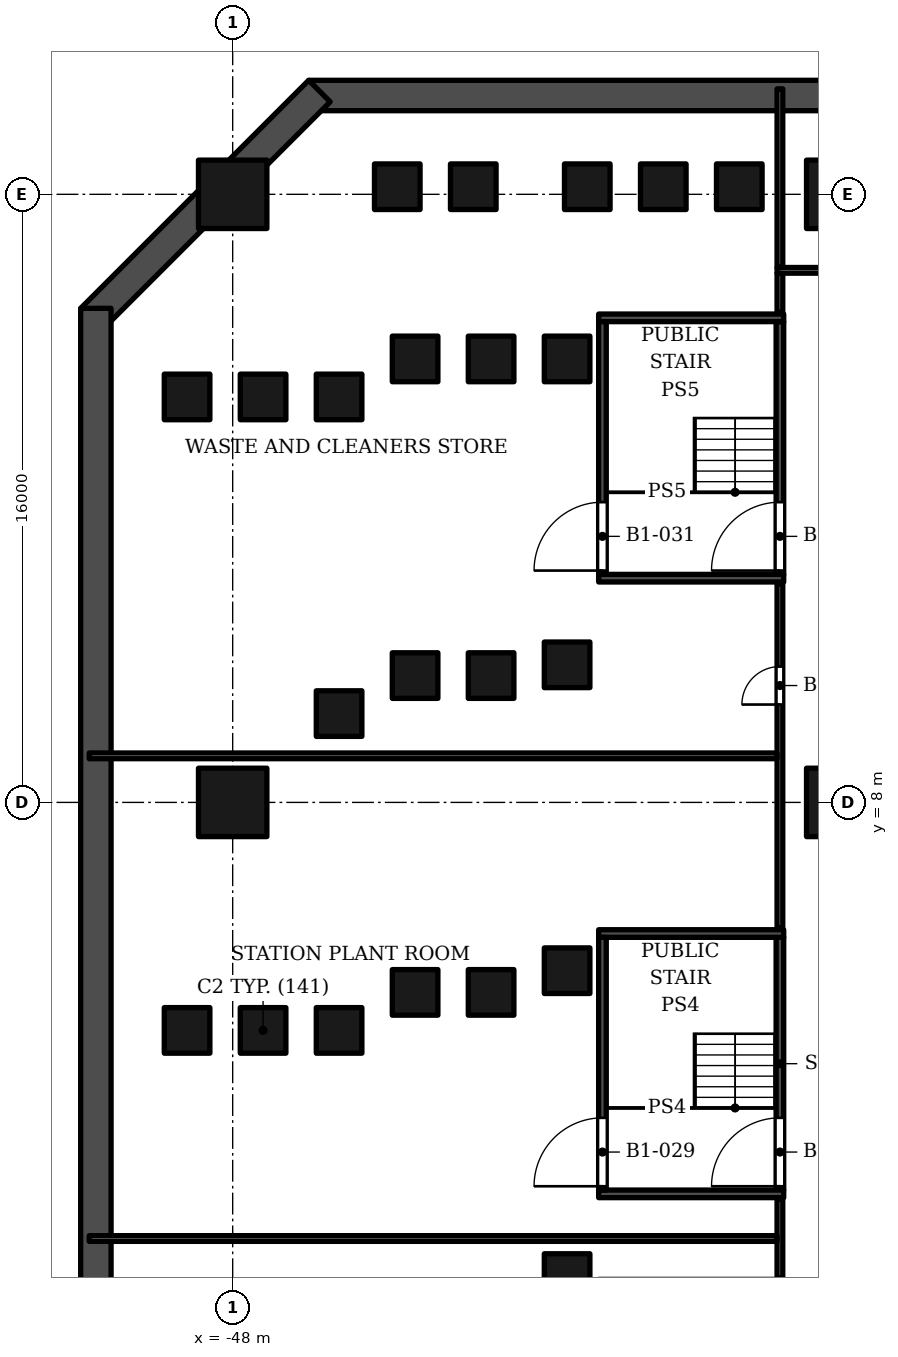
"""IFC4 building model, lengths in metres.
Left out: names, types, materials, properties, quantities, classifications, styles, units other than length and angle.
Written with IfcOpenShell. Run it as: python <this file> out.ifc"""

import sys

from ifc_helpers import new_model, si_unit, direction, frame, frame_2d, origin, origin_2d, place, context, subcontext, project, spatial, rectangle, extrude, element, fill, save


model = new_model("IFC4")
c1 = context("Model", 3, precision=1e-05, world=origin(), true_north=direction((0.0, 1.0)))
c2 = subcontext(c1, "Body", "Model", "MODEL_VIEW")
j1 = project(units=[si_unit("LENGTHUNIT", "METRE"), si_unit("PLANEANGLEUNIT", "RADIAN")], contexts=[c1])
p1 = place(None, origin())
s1 = spatial("IfcSite", under=j1, at=p1, CompositionType="ELEMENT")
p2 = place(p1, origin())
s2 = spatial("IfcBuilding", under=s1, at=p2, CompositionType="ELEMENT")
p3 = place(p2, frame((0.0, 0.0, -5.0)))
s3 = spatial("IfcBuildingStorey", under=s2, at=p3, CompositionType="ELEMENT", Elevation=-5.0)
p4 = place(p3, frame((46.0, 26.6, 0.0), z_axis=(0.0, 0.0, 1.0), x_axis=(-1.0, 0.0, 0.0)))
e1 = element("IfcWall", 1, at=p4, inside=s3, PredefinedType="SHEAR", context=c2, shape_type="SweptSolid", body=[
    extrude(rectangle(XDim=92.0, YDim=0.8, at=frame_2d((46.0, 0.0))), origin(), (0.0, 0.0, 1.0), 5.0),
])
p5 = place(p3, frame((-45.717, 26.717, 0.0), z_axis=(0.0, 0.0, 1.0), x_axis=(-0.707106781187, -0.707106781187, 0.0)))
e2 = element("IfcWall", 2, at=p5, inside=s3, PredefinedType="SHEAR", context=c2, shape_type="SweptSolid", body=[
    extrude(rectangle(XDim=8.485, YDim=0.8, at=frame_2d((4.243, 0.0))), origin(), (0.0, 0.0, 1.0), 5.0),
])
p6 = place(p3, frame((-51.6, 21.0, 0.0), z_axis=(0.0, 0.0, 1.0), x_axis=(0.0, -1.0, 0.0)))
e3 = element("IfcWall", 3, at=p6, inside=s3, PredefinedType="SHEAR", context=c2, shape_type="SweptSolid", body=[
    extrude(rectangle(XDim=32.6, YDim=0.8, at=frame_2d((16.3, 0.0))), origin(), (0.0, 0.0, 1.0), 5.0),
])
for number, where, z_axis, x_axis in (
    (4, (-48.0, 8.0, 0.0), (0.0, 0.0, 1.0), (1.0, 0.0, 0.0)),
    (5, (-48.0, 24.0, 0.0), (0.0, 0.0, 1.0), (1.0, 0.0, 0.0)),
    (6, (-32.0, 8.0, 0.0), (0.0, 0.0, 1.0), (1.0, 0.0, 0.0)),
    (7, (-32.0, 24.0, 0.0), (0.0, 0.0, 1.0), (1.0, 0.0, 0.0)),
):
    element("IfcColumn", number, at=place(p3, frame(where, z_axis=z_axis, x_axis=x_axis)), inside=s3, PredefinedType="COLUMN", context=c2, shape_type="SweptSolid", body=[
        extrude(rectangle(XDim=1.8, YDim=1.8, at=origin_2d()), origin(), (0.0, 0.0, 1.0), 5.0),
    ])
for number, where, z_axis, x_axis in (
    (8, (-39.2, 19.669, 0.0), (0.0, 0.0, 1.0), (1.0, 0.0, 0.0)),
    (9, (-34.669, 24.2, 0.0), (0.0, 0.0, 1.0), (1.0, 0.0, 0.0)),
    (10, (-39.2, -4.476, 0.0), (0.0, 0.0, 1.0), (1.0, 0.0, 0.0)),
    (11, (-39.2, 3.572, 0.0), (0.0, 0.0, 1.0), (1.0, 0.0, 0.0)),
    (12, (-39.2, 11.62, 0.0), (0.0, 0.0, 1.0), (1.0, 0.0, 0.0)),
    (13, (-41.2, 19.669, 0.0), (0.0, 0.0, 1.0), (1.0, 0.0, 0.0)),
    (14, (-36.669, 24.2, 0.0), (0.0, 0.0, 1.0), (1.0, 0.0, 0.0)),
    (15, (-41.2, 3.001, 0.0), (0.0, 0.0, 1.0), (1.0, 0.0, 0.0)),
    (16, (-41.2, 11.337, 0.0), (0.0, 0.0, 1.0), (1.0, 0.0, 0.0)),
    (17, (-43.2, 19.669, 0.0), (0.0, 0.0, 1.0), (1.0, 0.0, 0.0)),
    (18, (-38.669, 24.2, 0.0), (0.0, 0.0, 1.0), (1.0, 0.0, 0.0)),
    (19, (-43.2, 3.001, 0.0), (0.0, 0.0, 1.0), (1.0, 0.0, 0.0)),
    (20, (-43.2, 11.337, 0.0), (0.0, 0.0, 1.0), (1.0, 0.0, 0.0)),
    (21, (-45.2, 18.669, 0.0), (0.0, 0.0, 1.0), (1.0, 0.0, 0.0)),
    (22, (-45.2, 2.001, 0.0), (0.0, 0.0, 1.0), (1.0, 0.0, 0.0)),
    (23, (-45.2, 10.337, 0.0), (0.0, 0.0, 1.0), (1.0, 0.0, 0.0)),
    (24, (-47.2, 18.669, 0.0), (0.0, 0.0, 1.0), (1.0, 0.0, 0.0)),
    (25, (-41.669, 24.2, 0.0), (0.0, 0.0, 1.0), (1.0, 0.0, 0.0)),
    (26, (-47.2, 2.001, 0.0), (0.0, 0.0, 1.0), (1.0, 0.0, 0.0)),
    (27, (-49.2, 18.669, 0.0), (0.0, 0.0, 1.0), (1.0, 0.0, 0.0)),
    (28, (-43.669, 24.2, 0.0), (0.0, 0.0, 1.0), (1.0, 0.0, 0.0)),
    (29, (-49.2, 2.001, 0.0), (0.0, 0.0, 1.0), (1.0, 0.0, 0.0)),
):
    element("IfcColumn", number, at=place(p3, frame(where, z_axis=z_axis, x_axis=x_axis)), inside=s3, PredefinedType="COLUMN", context=c2, shape_type="SweptSolid", body=[
        extrude(rectangle(XDim=1.2, YDim=1.2, at=origin_2d()), origin(), (0.0, 0.0, 1.0), 5.0),
    ])
for number, where, z_axis, x_axis in (
    (30, (-38.37, -2.3, 0.0), (0.0, 0.0, 1.0), (1.0, 0.0, 0.0)),
    (31, (-38.37, 4.55, 0.0), (0.0, 0.0, 1.0), (1.0, 0.0, 0.0)),
):
    element("IfcWall", number, at=place(p3, frame(where, z_axis=z_axis, x_axis=x_axis)), inside=s3, PredefinedType="SOLIDWALL", context=c2, shape_type="SweptSolid", body=[
        extrude(rectangle(XDim=4.87, YDim=0.2, at=frame_2d((2.435, 0.0))), origin(), (0.0, 0.0, 1.0), 4.45),
    ])
p7 = place(p3, frame((-38.27, -2.2, 0.0), z_axis=(0.0, 0.0, 1.0), x_axis=(0.0, 1.0, 0.0)))
e32 = element("IfcWall", 32, at=p7, inside=s3, PredefinedType="SOLIDWALL", context=c2, shape_type="SweptSolid", body=[
    extrude(rectangle(XDim=6.65, YDim=0.2, at=frame_2d((3.325, 0.0))), origin(), (0.0, 0.0, 1.0), 4.45),
])
p8 = place(p7, frame((0.1, 0.0, 0.0)))
e33 = element("IfcOpeningElement", 33, at=p8, cuts=e32, PredefinedType="OPENING", context=c2, shape_type="SweptSolid", body=[
    extrude(rectangle(XDim=1.8, YDim=2.4, at=frame_2d((0.9, 1.2))), frame((0.0, 0.11, 0.0), z_axis=(0.0, -1.0, 0.0), x_axis=(1.0, 0.0, 0.0)), (0.0, 0.0, 1.0), 0.22),
])
p9 = place(p3, frame((-33.6, -2.2, 0.0), z_axis=(0.0, 0.0, 1.0), x_axis=(0.0, 1.0, 0.0)))
e34 = element("IfcWall", 34, at=p9, inside=s3, PredefinedType="SOLIDWALL", context=c2, shape_type="SweptSolid", body=[
    extrude(rectangle(XDim=6.65, YDim=0.2, at=frame_2d((3.325, 0.0))), origin(), (0.0, 0.0, 1.0), 4.45),
])
p10 = place(p9, frame((0.1, 0.0, 0.0)))
e35 = element("IfcOpeningElement", 35, at=p10, cuts=e34, PredefinedType="OPENING", context=c2, shape_type="SweptSolid", body=[
    extrude(rectangle(XDim=1.8, YDim=2.4, at=frame_2d((0.9, 1.2))), frame((0.0, 0.11, 0.0), z_axis=(0.0, -1.0, 0.0), x_axis=(1.0, 0.0, 0.0)), (0.0, 0.0, 1.0), 0.22),
])
for number, where, z_axis, x_axis in (
    (36, (-38.37, 13.9, 0.0), (0.0, 0.0, 1.0), (1.0, 0.0, 0.0)),
    (37, (-38.37, 20.75, 0.0), (0.0, 0.0, 1.0), (1.0, 0.0, 0.0)),
):
    element("IfcWall", number, at=place(p3, frame(where, z_axis=z_axis, x_axis=x_axis)), inside=s3, PredefinedType="SOLIDWALL", context=c2, shape_type="SweptSolid", body=[
        extrude(rectangle(XDim=4.87, YDim=0.2, at=frame_2d((2.435, 0.0))), origin(), (0.0, 0.0, 1.0), 4.45),
    ])
p11 = place(p3, frame((-38.27, 14.0, 0.0), z_axis=(0.0, 0.0, 1.0), x_axis=(0.0, 1.0, 0.0)))
e38 = element("IfcWall", 38, at=p11, inside=s3, PredefinedType="SOLIDWALL", context=c2, shape_type="SweptSolid", body=[
    extrude(rectangle(XDim=6.65, YDim=0.2, at=frame_2d((3.325, 0.0))), origin(), (0.0, 0.0, 1.0), 4.45),
])
p12 = place(p11, frame((0.1, 0.0, 0.0)))
e39 = element("IfcOpeningElement", 39, at=p12, cuts=e38, PredefinedType="OPENING", context=c2, shape_type="SweptSolid", body=[
    extrude(rectangle(XDim=1.8, YDim=2.4, at=frame_2d((0.9, 1.2))), frame((0.0, 0.11, 0.0), z_axis=(0.0, -1.0, 0.0), x_axis=(1.0, 0.0, 0.0)), (0.0, 0.0, 1.0), 0.22),
])
p13 = place(p3, frame((-33.6, 14.0, 0.0), z_axis=(0.0, 0.0, 1.0), x_axis=(0.0, 1.0, 0.0)))
e40 = element("IfcWall", 40, at=p13, inside=s3, PredefinedType="SOLIDWALL", context=c2, shape_type="SweptSolid", body=[
    extrude(rectangle(XDim=6.65, YDim=0.2, at=frame_2d((3.325, 0.0))), origin(), (0.0, 0.0, 1.0), 4.45),
])
p14 = place(p13, frame((0.1, 0.0, 0.0)))
e41 = element("IfcOpeningElement", 41, at=p14, cuts=e40, PredefinedType="OPENING", context=c2, shape_type="SweptSolid", body=[
    extrude(rectangle(XDim=1.8, YDim=2.4, at=frame_2d((0.9, 1.2))), frame((0.0, 0.11, 0.0), z_axis=(0.0, -1.0, 0.0), x_axis=(1.0, 0.0, 0.0)), (0.0, 0.0, 1.0), 0.22),
])
p15 = place(p3, frame((-33.6, -4.51, 0.0), z_axis=(0.0, 0.0, 1.0), x_axis=(0.0, 1.0, 0.0)))
e42 = element("IfcWall", 42, at=p15, inside=s3, PredefinedType="PARTITIONING", context=c2, shape_type="SweptSolid", body=[
    extrude(rectangle(XDim=2.07, YDim=0.15, at=frame_2d((1.035, 0.0))), origin(), (0.0, 0.0, 1.0), 4.45),
])
p16 = place(p3, frame((-51.775, -3.475, 0.0), z_axis=(0.0, 0.0, 1.0), x_axis=(1.0, 0.0, 0.0)))
e43 = element("IfcWall", 43, at=p16, inside=s3, PredefinedType="PARTITIONING", context=c2, shape_type="SweptSolid", body=[
    extrude(rectangle(XDim=18.1, YDim=0.15, at=frame_2d((9.05, 0.0))), origin(), (0.0, 0.0, 1.0), 3.55),
])
p17 = place(p3, frame((-33.6, 4.69, 0.0), z_axis=(0.0, 0.0, 1.0), x_axis=(0.0, 1.0, 0.0)))
e44 = element("IfcWall", 44, at=p17, inside=s3, PredefinedType="PARTITIONING", context=c2, shape_type="SweptSolid", body=[
    extrude(rectangle(XDim=9.07, YDim=0.15, at=frame_2d((4.535, 0.0))), origin(), (0.0, 0.0, 1.0), 3.25),
])
p18 = place(p17, frame((5.885, 0.0, 0.0)))
e45 = element("IfcOpeningElement", 45, at=p18, cuts=e44, PredefinedType="OPENING", context=c2, shape_type="SweptSolid", body=[
    extrude(rectangle(XDim=1.0, YDim=2.1, at=frame_2d((0.5, 1.05))), frame((0.0, 0.085, 0.0), z_axis=(0.0, -1.0, 0.0), x_axis=(1.0, 0.0, 0.0)), (0.0, 0.0, 1.0), 0.17),
])
p19 = place(p3, frame((-51.775, 9.225, 0.0), z_axis=(0.0, 0.0, 1.0), x_axis=(1.0, 0.0, 0.0)))
e46 = element("IfcWall", 46, at=p19, inside=s3, PredefinedType="PARTITIONING", context=c2, shape_type="SweptSolid", body=[
    extrude(rectangle(XDim=18.1, YDim=0.15, at=frame_2d((9.05, 0.0))), origin(), (0.0, 0.0, 1.0), 3.55),
])
p20 = place(p3, frame((-33.6, 20.89, 0.0), z_axis=(0.0, 0.0, 1.0), x_axis=(0.0, 1.0, 0.0)))
e47 = element("IfcWall", 47, at=p20, inside=s3, PredefinedType="PARTITIONING", context=c2, shape_type="SweptSolid", body=[
    extrude(rectangle(XDim=1.035, YDim=0.15, at=frame_2d((0.518, 0.0))), origin(), (0.0, 0.0, 1.0), 4.45),
])
p21 = place(p3, frame((-33.675, 22.0, 0.0), z_axis=(0.0, 0.0, 1.0), x_axis=(1.0, 0.0, 0.0)))
e48 = element("IfcWall", 48, at=p21, inside=s3, PredefinedType="PARTITIONING", context=c2, shape_type="SweptSolid", body=[
    extrude(rectangle(XDim=15.75, YDim=0.15, at=frame_2d((7.875, 0.0))), origin(), (0.0, 0.0, 1.0), 3.25),
])
p22 = place(p21, frame((8.275, 0.0, 0.0)))
e49 = element("IfcOpeningElement", 49, at=p22, cuts=e48, PredefinedType="OPENING", context=c2, shape_type="SweptSolid", body=[
    extrude(rectangle(XDim=0.9, YDim=2.1, at=frame_2d((0.45, 1.05))), frame((0.0, 0.085, 0.0), z_axis=(0.0, -1.0, 0.0), x_axis=(1.0, 0.0, 0.0)), (0.0, 0.0, 1.0), 0.17),
])
p23 = place(p21, frame((12.775, 0.0, 0.0)))
e50 = element("IfcOpeningElement", 50, at=p23, cuts=e48, PredefinedType="OPENING", context=c2, shape_type="SweptSolid", body=[
    extrude(rectangle(XDim=0.9, YDim=2.1, at=frame_2d((0.45, 1.05))), frame((0.0, 0.085, 0.0), z_axis=(0.0, -1.0, 0.0), x_axis=(1.0, 0.0, 0.0)), (0.0, 0.0, 1.0), 0.17),
])
p24 = place(p21, frame((3.925, 0.0, 0.0)))
e51 = element("IfcOpeningElement", 51, at=p24, cuts=e48, PredefinedType="OPENING", context=c2, shape_type="SweptSolid", body=[
    extrude(rectangle(XDim=1.0, YDim=2.1, at=frame_2d((0.5, 1.05))), frame((0.0, 0.085, 0.0), z_axis=(0.0, -1.0, 0.0), x_axis=(1.0, 0.0, 0.0)), (0.0, 0.0, 1.0), 0.17),
])
p25 = place(p3, frame((-33.6, 22.075, 0.0), z_axis=(0.0, 0.0, 1.0), x_axis=(0.0, 1.0, 0.0)))
e52 = element("IfcWall", 52, at=p25, inside=s3, PredefinedType="PARTITIONING", context=c2, shape_type="SweptSolid", body=[
    extrude(rectangle(XDim=4.7, YDim=0.15, at=frame_2d((2.35, 0.0))), origin(), (0.0, 0.0, 1.0), 3.55),
])
p26 = place(p10, origin())
e53 = element("IfcDoor", 53, at=p26, inside=s3, OperationType="DOUBLE_DOOR_SINGLE_SWING", PredefinedType="DOOR", context=c2, shape_type="SweptSolid", body=[
    extrude(rectangle(XDim=1.8, YDim=2.4, at=frame_2d((0.9, 1.2))), frame((0.0, 0.025, 0.0), z_axis=(0.0, -1.0, 0.0), x_axis=(1.0, 0.0, 0.0)), (0.0, 0.0, 1.0), 0.05),
])
fill(e35, e53)
p27 = place(p8, origin())
e54 = element("IfcDoor", 54, at=p27, inside=s3, OperationType="DOUBLE_DOOR_SINGLE_SWING", PredefinedType="DOOR", context=c2, shape_type="SweptSolid", body=[
    extrude(rectangle(XDim=1.8, YDim=2.4, at=frame_2d((0.9, 1.2))), frame((0.0, 0.025, 0.0), z_axis=(0.0, -1.0, 0.0), x_axis=(1.0, 0.0, 0.0)), (0.0, 0.0, 1.0), 0.05),
])
fill(e33, e54)
p28 = place(p14, origin())
e55 = element("IfcDoor", 55, at=p28, inside=s3, OperationType="DOUBLE_DOOR_SINGLE_SWING", PredefinedType="DOOR", context=c2, shape_type="SweptSolid", body=[
    extrude(rectangle(XDim=1.8, YDim=2.4, at=frame_2d((0.9, 1.2))), frame((0.0, 0.025, 0.0), z_axis=(0.0, -1.0, 0.0), x_axis=(1.0, 0.0, 0.0)), (0.0, 0.0, 1.0), 0.05),
])
fill(e41, e55)
p29 = place(p12, origin())
e56 = element("IfcDoor", 56, at=p29, inside=s3, OperationType="DOUBLE_DOOR_SINGLE_SWING", PredefinedType="DOOR", context=c2, shape_type="SweptSolid", body=[
    extrude(rectangle(XDim=1.8, YDim=2.4, at=frame_2d((0.9, 1.2))), frame((0.0, 0.025, 0.0), z_axis=(0.0, -1.0, 0.0), x_axis=(1.0, 0.0, 0.0)), (0.0, 0.0, 1.0), 0.05),
])
fill(e39, e56)
p30 = place(p18, origin())
e57 = element("IfcDoor", 57, at=p30, inside=s3, OperationType="SINGLE_SWING_LEFT", PredefinedType="DOOR", context=c2, shape_type="SweptSolid", body=[
    extrude(rectangle(XDim=1.0, YDim=2.1, at=frame_2d((0.5, 1.05))), frame((0.0, 0.025, 0.0), z_axis=(0.0, -1.0, 0.0), x_axis=(1.0, 0.0, 0.0)), (0.0, 0.0, 1.0), 0.05),
])
fill(e45, e57)
save(model, sys.argv[1])
